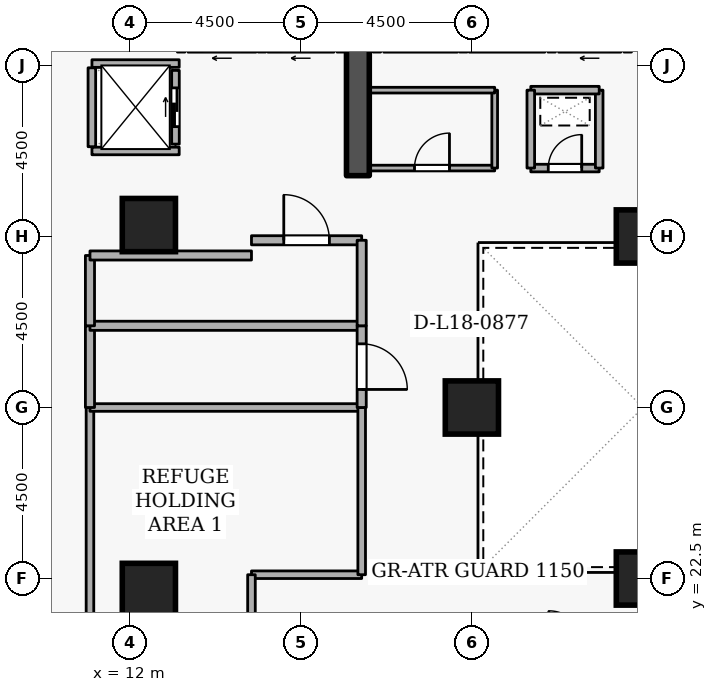
"""IFC4 building model, lengths in metres.
Left out: names, types, materials, properties, quantities, classifications, styles, units other than length and angle.
Written with IfcOpenShell. Run it as: python <this file> out.ifc"""

import sys

from ifc_helpers import new_model, si_unit, direction, frame, frame_2d, origin, origin_2d, place, context, subcontext, project, spatial, rectangle, extrude, element, fill, save


model = new_model("IFC4")
c1 = context("Model", 3, precision=1e-05, world=origin(), true_north=direction((0.0, 1.0)))
c2 = subcontext(c1, "Body", "Model", "MODEL_VIEW")
j1 = project(units=[si_unit("LENGTHUNIT", "METRE"), si_unit("PLANEANGLEUNIT", "RADIAN")], contexts=[c1])
p1 = place(None, origin())
s1 = spatial("IfcSite", under=j1, at=p1, CompositionType="ELEMENT")
p2 = place(p1, origin())
s2 = spatial("IfcBuilding", under=s1, at=p2, CompositionType="ELEMENT")
p3 = place(p2, frame((0.0, 0.0, 71.7)))
s3 = spatial("IfcBuildingStorey", under=s2, at=p3, CompositionType="ELEMENT", Elevation=71.7)
p4 = place(p3, frame((18.0, 33.1, 0.0), z_axis=(0.0, 0.0, 1.0), x_axis=(0.0, 1.0, 0.0)))
e1 = element("IfcWall", 1, at=p4, inside=s3, PredefinedType="SHEAR", context=c2, shape_type="SweptSolid", body=[
    extrude(rectangle(XDim=5.7, YDim=0.6, at=frame_2d((2.85, 0.0))), origin(), (0.0, 0.0, 1.0), 4.2),
])
for number, where, z_axis, x_axis in (
    (2, (12.5, 22.2, 0.0), (0.0, 0.0, 1.0), (1.0, 0.0, 0.0)),
    (3, (12.5, 31.8, 0.0), (0.0, 0.0, 1.0), (1.0, 0.0, 0.0)),
    (4, (25.5, 22.5, 0.0), (0.0, 0.0, 1.0), (1.0, 0.0, 0.0)),
    (5, (25.5, 31.5, 0.0), (0.0, 0.0, 1.0), (1.0, 0.0, 0.0)),
    (6, (21.0, 27.0, 0.0), (0.0, 0.0, 1.0), (1.0, 0.0, 0.0)),
):
    element("IfcColumn", number, at=place(p3, frame(where, z_axis=z_axis, x_axis=x_axis)), inside=s3, PredefinedType="COLUMN", context=c2, shape_type="SweptSolid", body=[
        extrude(rectangle(XDim=1.4, YDim=1.4, at=origin_2d()), origin(), (0.0, 0.0, 1.0), 4.2),
    ])
p5 = place(p3, frame((24.92, 36.45, 0.0), z_axis=(0.0, 0.0, 1.0), x_axis=(-1.0, 0.0, 0.0)))
e7 = element("IfcWall", 7, at=p5, inside=s3, PredefinedType="STANDARD", context=c2, shape_type="SweptSolid", body=[
    extrude(rectangle(XDim=1.64, YDim=0.2, at=frame_2d((0.82, 0.0))), origin(), (0.0, 0.0, 1.0), 3.86),
])
p6 = place(p5, frame((0.31, 0.0, 0.0)))
e8 = element("IfcOpeningElement", 8, at=p6, cuts=e7, PredefinedType="OPENING", context=c2, shape_type="SweptSolid", body=[
    extrude(rectangle(XDim=1.02, YDim=2.06, at=frame_2d((0.51, 1.03))), frame((0.0, 0.11, 0.0), z_axis=(0.0, -1.0, 0.0), x_axis=(1.0, 0.0, 0.0)), (0.0, 0.0, 1.0), 0.22),
])
p7 = place(p3, frame((22.92, 36.45, 0.0), z_axis=(0.0, 0.0, 1.0), x_axis=(-1.0, 0.0, 0.0)))
e9 = element("IfcWall", 9, at=p7, inside=s3, PredefinedType="STANDARD", context=c2, shape_type="SweptSolid", body=[
    extrude(rectangle(XDim=1.99, YDim=0.2, at=frame_2d((0.995, 0.0))), origin(), (0.0, 0.0, 1.0), 3.86),
])
p8 = place(p3, frame((20.62, 36.45, 0.0), z_axis=(0.0, 0.0, 1.0), x_axis=(-1.0, 0.0, 0.0)))
e10 = element("IfcWall", 10, at=p8, inside=s3, PredefinedType="STANDARD", context=c2, shape_type="SweptSolid", body=[
    extrude(rectangle(XDim=1.94, YDim=0.2, at=frame_2d((0.97, 0.0))), origin(), (0.0, 0.0, 1.0), 3.86),
])
p9 = place(p3, frame((17.37, 36.45, 0.0), z_axis=(0.0, 0.0, 1.0), x_axis=(-1.0, 0.0, 0.0)))
e11 = element("IfcWall", 11, at=p9, inside=s3, PredefinedType="STANDARD", context=c2, shape_type="SweptSolid", body=[
    extrude(rectangle(XDim=1.74, YDim=0.2, at=frame_2d((0.87, 0.0))), origin(), (0.0, 0.0, 1.0), 3.86),
])
p10 = place(p9, frame((0.36, 0.0, 0.0)))
e12 = element("IfcOpeningElement", 12, at=p10, cuts=e11, PredefinedType="OPENING", context=c2, shape_type="SweptSolid", body=[
    extrude(rectangle(XDim=1.02, YDim=2.06, at=frame_2d((0.51, 1.03))), frame((0.0, 0.11, 0.0), z_axis=(0.0, -1.0, 0.0), x_axis=(1.0, 0.0, 0.0)), (0.0, 0.0, 1.0), 0.22),
])
p11 = place(p3, frame((15.32, 36.45, 0.0), z_axis=(0.0, 0.0, 1.0), x_axis=(-1.0, 0.0, 0.0)))
e13 = element("IfcWall", 13, at=p11, inside=s3, PredefinedType="STANDARD", context=c2, shape_type="SweptSolid", body=[
    extrude(rectangle(XDim=1.79, YDim=0.2, at=frame_2d((0.895, 0.0))), origin(), (0.0, 0.0, 1.0), 3.86),
])
p12 = place(p11, frame((0.385, 0.0, 0.0)))
e14 = element("IfcOpeningElement", 14, at=p12, cuts=e13, PredefinedType="OPENING", context=c2, shape_type="SweptSolid", body=[
    extrude(rectangle(XDim=1.02, YDim=2.06, at=frame_2d((0.51, 1.03))), frame((0.0, 0.11, 0.0), z_axis=(0.0, -1.0, 0.0), x_axis=(1.0, 0.0, 0.0)), (0.0, 0.0, 1.0), 0.22),
])
p13 = place(p3, frame((13.2, 33.93, 0.0), z_axis=(0.0, 0.0, 1.0), x_axis=(0.0, 1.0, 0.0)))
e15 = element("IfcWall", 15, at=p13, inside=s3, PredefinedType="STANDARD", context=c2, shape_type="SweptSolid", body=[
    extrude(rectangle(XDim=1.94, YDim=0.2, at=frame_2d((0.97, 0.0))), origin(), (0.0, 0.0, 1.0), 3.86),
])
p14 = place(p13, frame((0.46, 0.0, 0.0)))
e16 = element("IfcOpeningElement", 16, at=p14, cuts=e15, PredefinedType="OPENING", context=c2, shape_type="SweptSolid", body=[
    extrude(rectangle(XDim=1.02, YDim=2.06, at=frame_2d((0.51, 1.03))), frame((0.0, 0.11, 0.0), z_axis=(0.0, -1.0, 0.0), x_axis=(1.0, 0.0, 0.0)), (0.0, 0.0, 1.0), 0.22),
])
for number, where, z_axis, x_axis in (
    (17, (11.002, 36.05, 0.0), (0.0, 0.0, 1.0), (1.0, 0.0, 0.0)),
    (18, (11.002, 33.75, 0.0), (0.0, 0.0, 1.0), (1.0, 0.0, 0.0)),
):
    element("IfcWall", number, at=place(p3, frame(where, z_axis=z_axis, x_axis=x_axis)), inside=s3, PredefinedType="STANDARD", context=c2, shape_type="SweptSolid", body=[
        extrude(rectangle(XDim=2.296, YDim=0.2, at=frame_2d((1.148, 0.0))), origin(), (0.0, 0.0, 1.0), 3.86),
    ])
p15 = place(p3, frame((11.0, 33.862, 0.0), z_axis=(0.0, 0.0, 1.0), x_axis=(0.0, 1.0, 0.0)))
e19 = element("IfcWall", 19, at=p15, inside=s3, PredefinedType="STANDARD", context=c2, shape_type="SweptSolid", body=[
    extrude(rectangle(XDim=2.076, YDim=0.2, at=frame_2d((1.038, 0.0))), origin(), (0.0, 0.0, 1.0), 3.86),
])
p16 = place(p3, frame((22.55, 33.3, 0.0), z_axis=(0.0, 0.0, 1.0), x_axis=(1.0, 0.0, 0.0)))
e20 = element("IfcWall", 20, at=p16, inside=s3, PredefinedType="STANDARD", context=c2, shape_type="SweptSolid", body=[
    extrude(rectangle(XDim=1.8, YDim=0.2, at=frame_2d((0.9, 0.0))), origin(), (0.0, 0.0, 1.0), 3.86),
])
p17 = place(p16, frame((0.46, 0.0, 0.0)))
e21 = element("IfcOpeningElement", 21, at=p17, cuts=e20, PredefinedType="OPENING", context=c2, shape_type="SweptSolid", body=[
    extrude(rectangle(XDim=0.88, YDim=2.04, at=frame_2d((0.44, 1.02))), frame((0.0, 0.11, 0.0), z_axis=(0.0, -1.0, 0.0), x_axis=(1.0, 0.0, 0.0)), (0.0, 0.0, 1.0), 0.22),
])
p18 = place(p3, frame((24.35, 33.3, 0.0), z_axis=(0.0, 0.0, 1.0), x_axis=(0.0, 1.0, 0.0)))
e22 = element("IfcWall", 22, at=p18, inside=s3, PredefinedType="STANDARD", context=c2, shape_type="SweptSolid", body=[
    extrude(rectangle(XDim=2.05, YDim=0.2, at=frame_2d((1.025, 0.0))), origin(), (0.0, 0.0, 1.0), 3.86),
])
p19 = place(p3, frame((24.35, 35.35, 0.0), z_axis=(0.0, 0.0, 1.0), x_axis=(-1.0, 0.0, 0.0)))
e23 = element("IfcWall", 23, at=p19, inside=s3, PredefinedType="STANDARD", context=c2, shape_type="SweptSolid", body=[
    extrude(rectangle(XDim=1.8, YDim=0.2, at=frame_2d((0.9, 0.0))), origin(), (0.0, 0.0, 1.0), 3.86),
])
p20 = place(p3, frame((22.55, 35.35, 0.0), z_axis=(0.0, 0.0, 1.0), x_axis=(0.0, -1.0, 0.0)))
e24 = element("IfcWall", 24, at=p20, inside=s3, PredefinedType="STANDARD", context=c2, shape_type="SweptSolid", body=[
    extrude(rectangle(XDim=2.05, YDim=0.2, at=frame_2d((1.025, 0.0))), origin(), (0.0, 0.0, 1.0), 3.86),
])
p21 = place(p3, frame((18.1, 22.6, 0.0), z_axis=(0.0, 0.0, 1.0), x_axis=(-1.0, 0.0, 0.0)))
e25 = element("IfcWall", 25, at=p21, inside=s3, PredefinedType="STANDARD", context=c2, shape_type="SweptSolid", body=[
    extrude(rectangle(XDim=2.9, YDim=0.2, at=frame_2d((1.45, 0.0))), origin(), (0.0, 0.0, 1.0), 3.86),
])
p22 = place(p3, frame((15.2, 22.6, 0.0), z_axis=(0.0, 0.0, 1.0), x_axis=(0.0, -1.0, 0.0)))
e26 = element("IfcWall", 26, at=p22, inside=s3, PredefinedType="STANDARD", context=c2, shape_type="SweptSolid", body=[
    extrude(rectangle(XDim=1.9, YDim=0.2, at=frame_2d((0.95, 0.0))), origin(), (0.0, 0.0, 1.0), 3.86),
])
p23 = place(p3, frame((10.95, 8.895, 0.0), z_axis=(0.0, 0.0, 1.0), x_axis=(0.0, 1.0, 0.0)))
e27 = element("IfcWall", 27, at=p23, inside=s3, PredefinedType="STANDARD", context=c2, shape_type="SweptSolid", body=[
    extrude(rectangle(XDim=18.105, YDim=0.2, at=frame_2d((9.052, 0.0))), origin(), (0.0, 0.0, 1.0), 3.365),
])
p24 = place(p3, frame((10.95, 27.0, 0.0), z_axis=(0.0, 0.0, 1.0), x_axis=(1.0, 0.0, 0.0)))
e28 = element("IfcWall", 28, at=p24, inside=s3, PredefinedType="STANDARD", context=c2, shape_type="SweptSolid", body=[
    extrude(rectangle(XDim=7.15, YDim=0.2, at=frame_2d((3.575, 0.0))), origin(), (0.0, 0.0, 1.0), 3.245),
])
p25 = place(p3, frame((18.1, 27.0, 0.0), z_axis=(0.0, 0.0, 1.0), x_axis=(0.0, -1.0, 0.0)))
e29 = element("IfcWall", 29, at=p25, inside=s3, PredefinedType="STANDARD", context=c2, shape_type="SweptSolid", body=[
    extrude(rectangle(XDim=4.4, YDim=0.2, at=frame_2d((2.2, 0.0))), origin(), (0.0, 0.0, 1.0), 3.065),
])
p26 = place(p3, frame((10.95, 27.0, 0.0), z_axis=(0.0, 0.0, 1.0), x_axis=(0.0, 1.0, 0.0)))
e30 = element("IfcWall", 30, at=p26, inside=s3, PredefinedType="STANDARD", context=c2, shape_type="SweptSolid", body=[
    extrude(rectangle(XDim=2.15, YDim=0.24, at=frame_2d((1.075, 0.0))), origin(), (0.0, 0.0, 1.0), 3.86),
])
p27 = place(p3, frame((10.95, 29.15, 0.0), z_axis=(0.0, 0.0, 1.0), x_axis=(1.0, 0.0, 0.0)))
e31 = element("IfcWall", 31, at=p27, inside=s3, PredefinedType="STANDARD", context=c2, shape_type="SweptSolid", body=[
    extrude(rectangle(XDim=7.15, YDim=0.24, at=frame_2d((3.575, 0.0))), origin(), (0.0, 0.0, 1.0), 3.86),
])
p28 = place(p3, frame((18.1, 29.15, 0.0), z_axis=(0.0, 0.0, 1.0), x_axis=(0.0, -1.0, 0.0)))
e32 = element("IfcWall", 32, at=p28, inside=s3, PredefinedType="STANDARD", context=c2, shape_type="SweptSolid", body=[
    extrude(rectangle(XDim=2.15, YDim=0.24, at=frame_2d((1.075, 0.0))), origin(), (0.0, 0.0, 1.0), 3.065),
])
p29 = place(p28, frame((0.475, 0.0, 0.0)))
e33 = element("IfcOpeningElement", 33, at=p29, cuts=e32, PredefinedType="OPENING", context=c2, shape_type="SweptSolid", body=[
    extrude(rectangle(XDim=1.2, YDim=2.1, at=frame_2d((0.6, 1.05))), frame((0.0, 0.13, 0.0), z_axis=(0.0, -1.0, 0.0), x_axis=(1.0, 0.0, 0.0)), (0.0, 0.0, 1.0), 0.26),
])
p30 = place(p3, frame((15.2, 31.4, 0.0), z_axis=(0.0, 0.0, 1.0), x_axis=(1.0, 0.0, 0.0)))
e34 = element("IfcWall", 34, at=p30, inside=s3, PredefinedType="STANDARD", context=c2, shape_type="SweptSolid", body=[
    extrude(rectangle(XDim=2.9, YDim=0.24, at=frame_2d((1.45, 0.0))), origin(), (0.0, 0.0, 1.0), 3.86),
])
p31 = place(p30, frame((0.85, 0.0, 0.0)))
e35 = element("IfcOpeningElement", 35, at=p31, cuts=e34, PredefinedType="OPENING", context=c2, shape_type="SweptSolid", body=[
    extrude(rectangle(XDim=1.2, YDim=2.1, at=frame_2d((0.6, 1.05))), frame((0.0, 0.13, 0.0), z_axis=(0.0, -1.0, 0.0), x_axis=(1.0, 0.0, 0.0)), (0.0, 0.0, 1.0), 0.26),
])
p32 = place(p3, frame((18.1, 31.4, 0.0), z_axis=(0.0, 0.0, 1.0), x_axis=(0.0, -1.0, 0.0)))
e36 = element("IfcWall", 36, at=p32, inside=s3, PredefinedType="STANDARD", context=c2, shape_type="SweptSolid", body=[
    extrude(rectangle(XDim=2.25, YDim=0.24, at=frame_2d((1.125, 0.0))), origin(), (0.0, 0.0, 1.0), 3.065),
])
p33 = place(p3, frame((10.95, 29.15, 0.0), z_axis=(0.0, 0.0, 1.0), x_axis=(0.0, 1.0, 0.0)))
e37 = element("IfcWall", 37, at=p33, inside=s3, PredefinedType="STANDARD", context=c2, shape_type="SweptSolid", body=[
    extrude(rectangle(XDim=1.85, YDim=0.24, at=frame_2d((0.925, 0.0))), origin(), (0.0, 0.0, 1.0), 3.86),
])
p34 = place(p3, frame((10.95, 31.0, 0.0), z_axis=(0.0, 0.0, 1.0), x_axis=(1.0, 0.0, 0.0)))
e38 = element("IfcWall", 38, at=p34, inside=s3, PredefinedType="STANDARD", context=c2, shape_type="SweptSolid", body=[
    extrude(rectangle(XDim=4.25, YDim=0.24, at=frame_2d((2.125, 0.0))), origin(), (0.0, 0.0, 1.0), 3.86),
])
p35 = place(p3, frame((18.3, 33.3, 0.0), z_axis=(0.0, 0.0, 1.0), x_axis=(1.0, 0.0, 0.0)))
e39 = element("IfcWall", 39, at=p35, inside=s3, PredefinedType="PARTITIONING", context=c2, shape_type="SweptSolid", body=[
    extrude(rectangle(XDim=3.3, YDim=0.15, at=frame_2d((1.65, 0.0))), origin(), (0.0, 0.0, 1.0), 3.86),
])
p36 = place(p35, frame((1.19, 0.0, 0.0)))
e40 = element("IfcOpeningElement", 40, at=p36, cuts=e39, PredefinedType="OPENING", context=c2, shape_type="SweptSolid", body=[
    extrude(rectangle(XDim=0.92, YDim=2.08, at=frame_2d((0.46, 1.04))), frame((0.0, 0.085, 0.0), z_axis=(0.0, -1.0, 0.0), x_axis=(1.0, 0.0, 0.0)), (0.0, 0.0, 1.0), 0.17),
])
p37 = place(p3, frame((21.6, 33.3, 0.0), z_axis=(0.0, 0.0, 1.0), x_axis=(0.0, 1.0, 0.0)))
e41 = element("IfcWall", 41, at=p37, inside=s3, PredefinedType="PARTITIONING", context=c2, shape_type="SweptSolid", body=[
    extrude(rectangle(XDim=2.05, YDim=0.15, at=frame_2d((1.025, 0.0))), origin(), (0.0, 0.0, 1.0), 3.86),
])
p38 = place(p3, frame((21.6, 35.35, 0.0), z_axis=(0.0, 0.0, 1.0), x_axis=(-1.0, 0.0, 0.0)))
e42 = element("IfcWall", 42, at=p38, inside=s3, PredefinedType="PARTITIONING", context=c2, shape_type="SweptSolid", body=[
    extrude(rectangle(XDim=3.3, YDim=0.15, at=frame_2d((1.65, 0.0))), origin(), (0.0, 0.0, 1.0), 3.86),
])
p39 = place(p14, origin())
e43 = element("IfcDoor", 43, at=p39, inside=s3, OperationType="SLIDING_TO_LEFT", PredefinedType="DOOR", context=c2, shape_type="SweptSolid", body=[
    extrude(rectangle(XDim=1.02, YDim=2.06, at=frame_2d((0.51, 1.03))), frame((0.0, 0.025, 0.0), z_axis=(0.0, -1.0, 0.0), x_axis=(1.0, 0.0, 0.0)), (0.0, 0.0, 1.0), 0.05),
])
fill(e16, e43)
p40 = place(p17, origin())
e44 = element("IfcDoor", 44, at=p40, inside=s3, OperationType="SINGLE_SWING_RIGHT", PredefinedType="DOOR", context=c2, shape_type="SweptSolid", body=[
    extrude(rectangle(XDim=0.88, YDim=2.04, at=frame_2d((0.44, 1.02))), frame((0.0, 0.025, 0.0), z_axis=(0.0, -1.0, 0.0), x_axis=(1.0, 0.0, 0.0)), (0.0, 0.0, 1.0), 0.05),
])
fill(e21, e44)
p41 = place(p36, origin())
e45 = element("IfcDoor", 45, at=p41, inside=s3, OperationType="SINGLE_SWING_RIGHT", PredefinedType="DOOR", context=c2, shape_type="SweptSolid", body=[
    extrude(rectangle(XDim=0.92, YDim=2.08, at=frame_2d((0.46, 1.04))), frame((0.0, 0.025, 0.0), z_axis=(0.0, -1.0, 0.0), x_axis=(1.0, 0.0, 0.0)), (0.0, 0.0, 1.0), 0.05),
])
fill(e40, e45)
p42 = place(p29, origin())
e46 = element("IfcDoor", 46, at=p42, inside=s3, OperationType="SINGLE_SWING_RIGHT", PredefinedType="DOOR", context=c2, shape_type="SweptSolid", body=[
    extrude(rectangle(XDim=1.2, YDim=2.1, at=frame_2d((0.6, 1.05))), frame((0.0, 0.025, 0.0), z_axis=(0.0, -1.0, 0.0), x_axis=(1.0, 0.0, 0.0)), (0.0, 0.0, 1.0), 0.05),
])
fill(e33, e46)
p43 = place(p31, origin())
e47 = element("IfcDoor", 47, at=p43, inside=s3, OperationType="SINGLE_SWING_LEFT", PredefinedType="DOOR", context=c2, shape_type="SweptSolid", body=[
    extrude(rectangle(XDim=1.2, YDim=2.1, at=frame_2d((0.6, 1.05))), frame((0.0, 0.025, 0.0), z_axis=(0.0, -1.0, 0.0), x_axis=(1.0, 0.0, 0.0)), (0.0, 0.0, 1.0), 0.05),
])
fill(e35, e47)
save(model, sys.argv[1])
